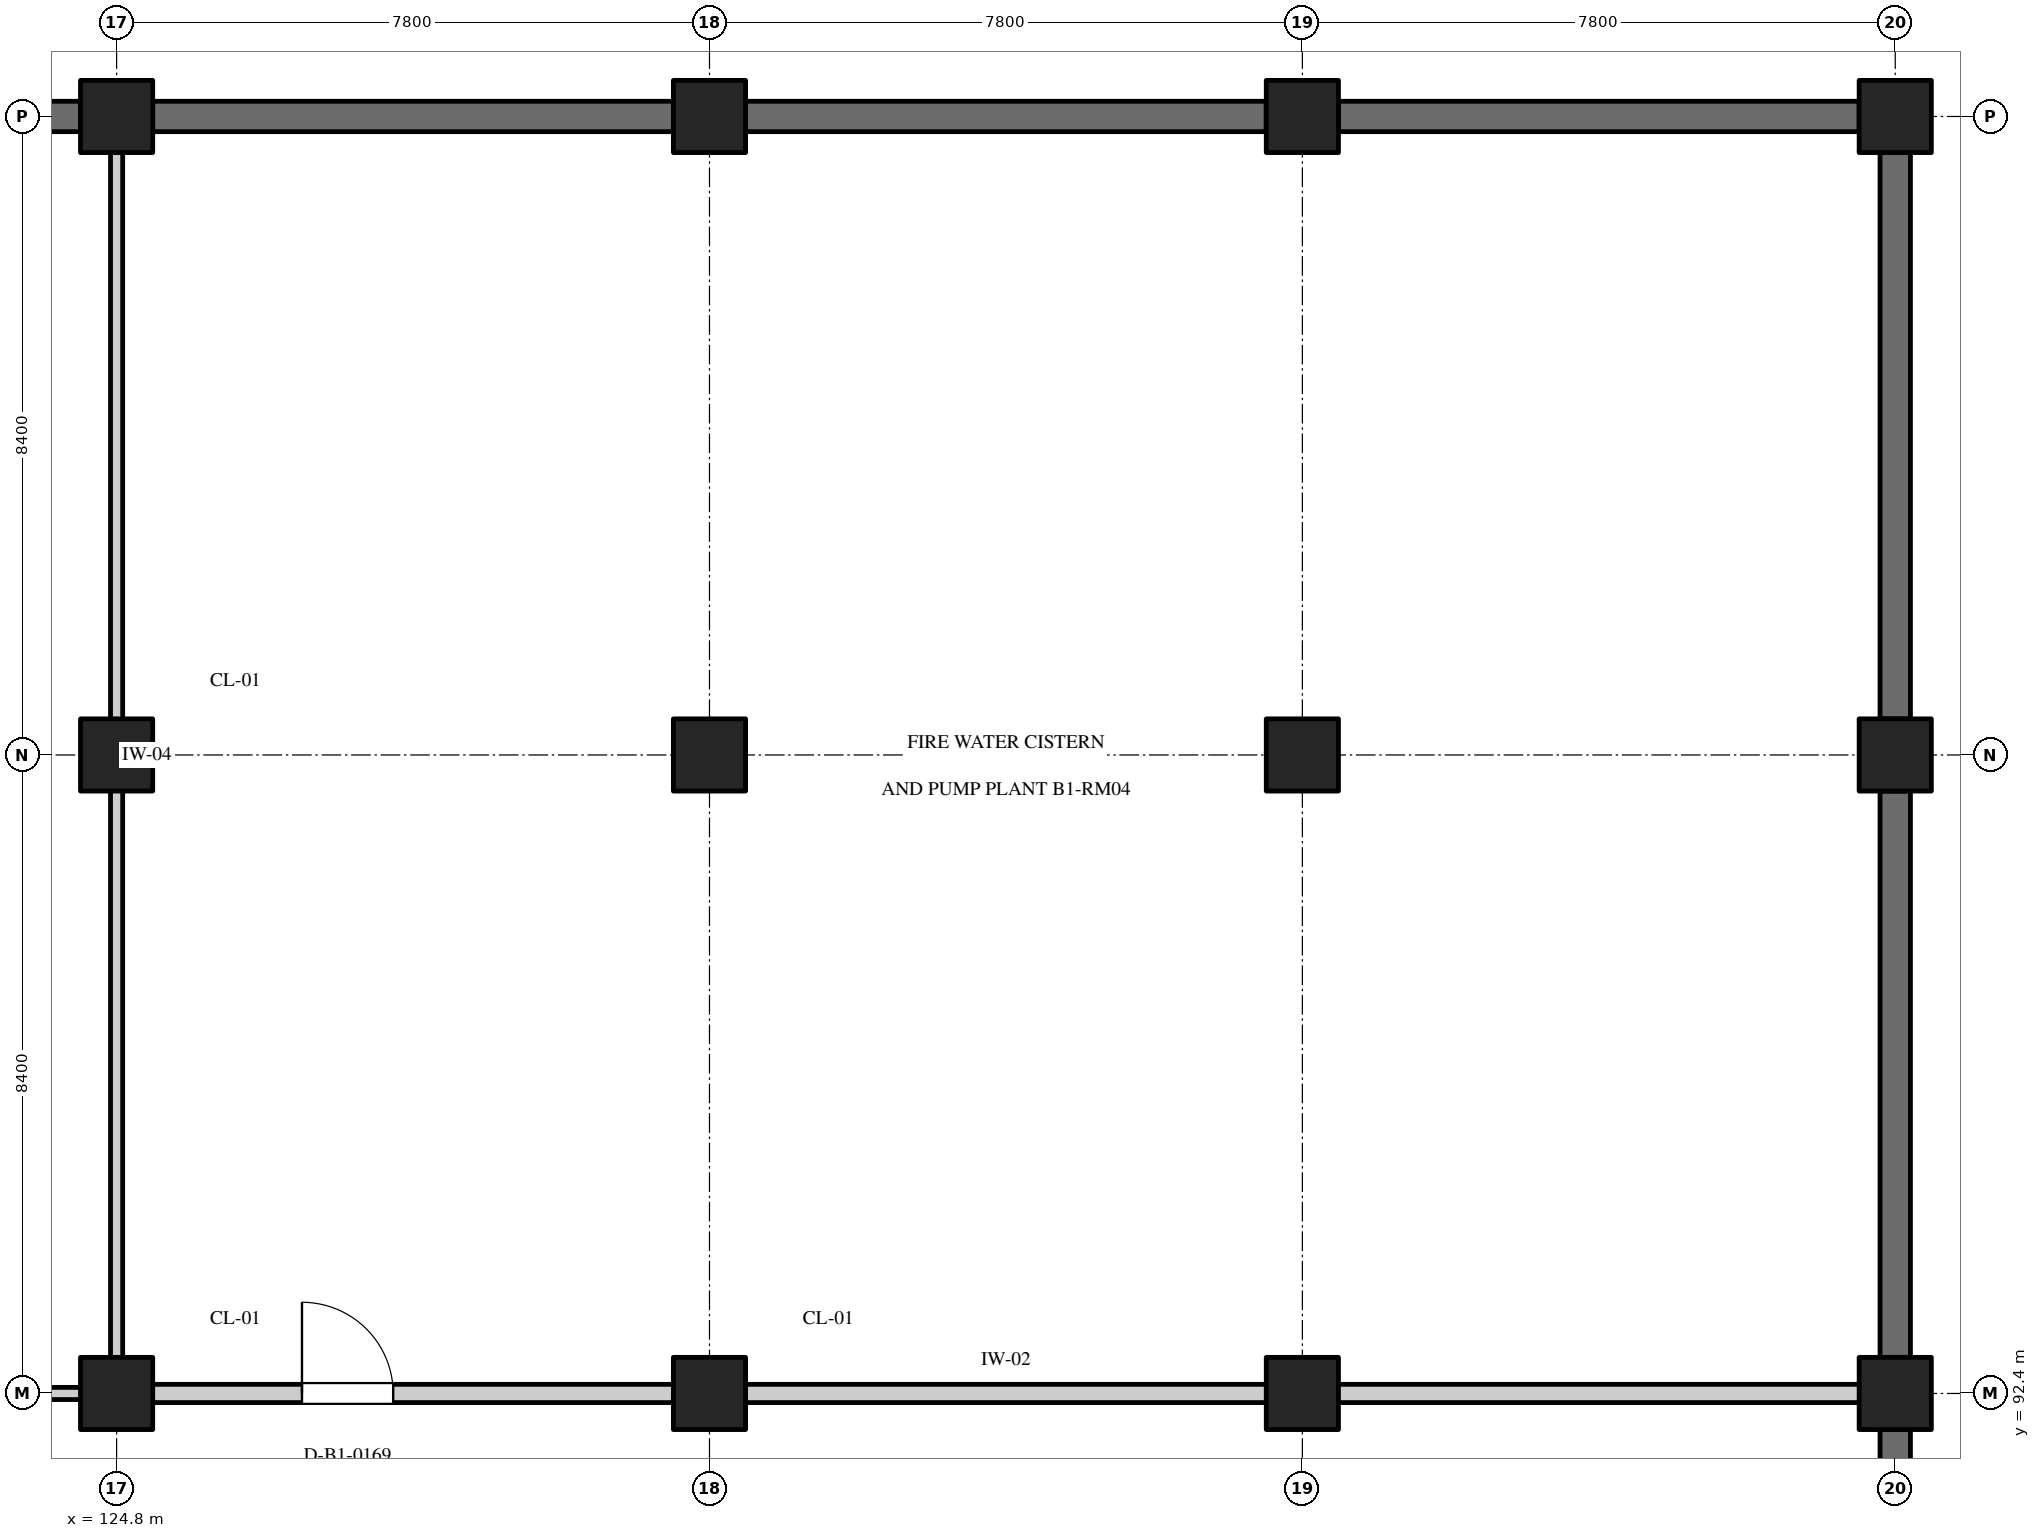
"""IFC4 building model, lengths in metres.
Left out: names, types, materials, properties, quantities, classifications, styles, units other than length and angle.
Written with IfcOpenShell. Run it as: python <this file> out.ifc"""

import sys

from ifc_helpers import new_model, si_unit, direction, frame, frame_2d, origin, origin_2d, place, context, subcontext, project, spatial, rectangle, extrude, element, fill, save


model = new_model("IFC4")
c1 = context("Model", 3, precision=1e-05, world=origin(), true_north=direction((0.0, 1.0)))
c2 = subcontext(c1, "Body", "Model", "MODEL_VIEW")
j1 = project(units=[si_unit("LENGTHUNIT", "METRE"), si_unit("PLANEANGLEUNIT", "RADIAN")], contexts=[c1])
p1 = place(None, origin())
s1 = spatial("IfcSite", under=j1, at=p1, CompositionType="ELEMENT")
p2 = place(p1, origin())
s2 = spatial("IfcBuilding", under=s1, at=p2, CompositionType="ELEMENT")
p3 = place(p2, frame((0.0, 0.0, -4.5)))
s3 = spatial("IfcBuildingStorey", under=s2, at=p3, CompositionType="ELEMENT", Elevation=-4.5)
for number, where, z_axis, x_axis in (
    (1, (124.8, 92.4, 0.0), (0.0, 0.0, 1.0), (1.0, 0.0, 0.0)),
    (2, (124.8, 100.8, 0.0), (0.0, 0.0, 1.0), (1.0, 0.0, 0.0)),
    (3, (124.8, 109.2, 0.0), (0.0, 0.0, 1.0), (1.0, 0.0, 0.0)),
    (4, (132.6, 92.4, 0.0), (0.0, 0.0, 1.0), (1.0, 0.0, 0.0)),
    (5, (132.6, 100.8, 0.0), (0.0, 0.0, 1.0), (1.0, 0.0, 0.0)),
    (6, (132.6, 109.2, 0.0), (0.0, 0.0, 1.0), (1.0, 0.0, 0.0)),
    (7, (140.4, 92.4, 0.0), (0.0, 0.0, 1.0), (1.0, 0.0, 0.0)),
    (8, (140.4, 100.8, 0.0), (0.0, 0.0, 1.0), (1.0, 0.0, 0.0)),
    (9, (140.4, 109.2, 0.0), (0.0, 0.0, 1.0), (1.0, 0.0, 0.0)),
    (10, (148.2, 92.4, 0.0), (0.0, 0.0, 1.0), (1.0, 0.0, 0.0)),
    (11, (148.2, 100.8, 0.0), (0.0, 0.0, 1.0), (1.0, 0.0, 0.0)),
    (12, (148.2, 109.2, 0.0), (0.0, 0.0, 1.0), (1.0, 0.0, 0.0)),
):
    element("IfcColumn", number, at=place(p3, frame(where, z_axis=z_axis, x_axis=x_axis)), inside=s3, PredefinedType="COLUMN", context=c2, shape_type="SweptSolid", body=[
        extrude(rectangle(XDim=0.95, YDim=0.95, at=origin_2d()), origin(), (0.0, 0.0, 1.0), 4.5),
    ])
p4 = place(p3, frame((117.475, 109.2, 0.0), z_axis=(0.0, 0.0, 1.0), x_axis=(1.0, 0.0, 0.0)))
e13 = element("IfcWall", 13, at=p4, inside=s3, PredefinedType="SOLIDWALL", context=c2, shape_type="SweptSolid", body=[
    extrude(rectangle(XDim=6.85, YDim=0.4, at=frame_2d((3.425, 0.0))), origin(), (0.0, 0.0, 1.0), 3.45),
])
for number, where, z_axis, x_axis in (
    (14, (125.275, 109.2, 0.0), (0.0, 0.0, 1.0), (1.0, 0.0, 0.0)),
    (15, (133.075, 109.2, 0.0), (0.0, 0.0, 1.0), (1.0, 0.0, 0.0)),
    (16, (140.875, 109.2, 0.0), (0.0, 0.0, 1.0), (1.0, 0.0, 0.0)),
):
    element("IfcWall", number, at=place(p3, frame(where, z_axis=z_axis, x_axis=x_axis)), inside=s3, PredefinedType="SOLIDWALL", context=c2, shape_type="SweptSolid", body=[
        extrude(rectangle(XDim=6.85, YDim=0.4, at=frame_2d((3.425, 0.0))), origin(), (0.0, 0.0, 1.0), 3.45),
    ])
for number, where, z_axis, x_axis in (
    (17, (148.2, 84.475, 0.0), (0.0, 0.0, 1.0), (0.0, 1.0, 0.0)),
    (18, (148.2, 92.875, 0.0), (0.0, 0.0, 1.0), (0.0, 1.0, 0.0)),
):
    element("IfcWall", number, at=place(p3, frame(where, z_axis=z_axis, x_axis=x_axis)), inside=s3, PredefinedType="SOLIDWALL", context=c2, shape_type="SweptSolid", body=[
        extrude(rectangle(XDim=7.45, YDim=0.4, at=frame_2d((3.725, 0.0))), origin(), (0.0, 0.0, 1.0), 3.45),
    ])
p5 = place(p3, frame((148.2, 101.275, 0.0), z_axis=(0.0, 0.0, 1.0), x_axis=(0.0, 1.0, 0.0)))
e19 = element("IfcWall", 19, at=p5, inside=s3, PredefinedType="SOLIDWALL", context=c2, shape_type="SweptSolid", body=[
    extrude(rectangle(XDim=7.45, YDim=0.4, at=frame_2d((3.725, 0.0))), origin(), (0.0, 0.0, 1.0), 3.45),
])
p6 = place(p3, frame((101.485, 92.4, 0.0), z_axis=(0.0, 0.0, 1.0), x_axis=(1.0, 0.0, 0.0)))
e20 = element("IfcWall", 20, at=p6, inside=s3, PredefinedType="PARTITIONING", context=c2, shape_type="SweptSolid", body=[
    extrude(rectangle(XDim=23.23, YDim=0.16, at=frame_2d((11.615, 0.0))), origin(), (0.0, 0.0, 1.0), 3.4),
])
p7 = place(p6, frame((2.338, 0.0, 0.0)))
e21 = element("IfcOpeningElement", 21, at=p7, cuts=e20, PredefinedType="OPENING", context=c2, shape_type="SweptSolid", body=[
    extrude(rectangle(XDim=1.2, YDim=2.15, at=frame_2d((0.6, 1.075))), frame((0.0, 0.092, 0.0), z_axis=(0.0, -1.0, 0.0), x_axis=(1.0, 0.0, 0.0)), (0.0, 0.0, 1.0), 0.184),
])
p8 = place(p3, frame((124.8, 92.485, 0.0), z_axis=(0.0, 0.0, 1.0), x_axis=(0.0, 1.0, 0.0)))
e22 = element("IfcWall", 22, at=p8, inside=s3, PredefinedType="PARTITIONING", context=c2, shape_type="SweptSolid", body=[
    extrude(rectangle(XDim=16.63, YDim=0.16, at=frame_2d((8.315, 0.0))), origin(), (0.0, 0.0, 1.0), 4.13),
])
p9 = place(p3, frame((124.91, 92.4, 0.0), z_axis=(0.0, 0.0, 1.0), x_axis=(1.0, 0.0, 0.0)))
e23 = element("IfcWall", 23, at=p9, inside=s3, PredefinedType="STANDARD", context=c2, shape_type="SweptSolid", body=[
    extrude(rectangle(XDim=23.18, YDim=0.24, at=frame_2d((11.59, 0.0))), origin(), (0.0, 0.0, 1.0), 3.4),
])
p10 = place(p9, frame((2.329, 0.0, 0.0)))
e24 = element("IfcOpeningElement", 24, at=p10, cuts=e23, PredefinedType="OPENING", context=c2, shape_type="SweptSolid", body=[
    extrude(rectangle(XDim=1.2, YDim=2.15, at=frame_2d((0.6, 1.075))), frame((0.0, 0.132, 0.0), z_axis=(0.0, -1.0, 0.0), x_axis=(1.0, 0.0, 0.0)), (0.0, 0.0, 1.0), 0.264),
])
for number, where, z_axis, x_axis in (
    (25, (132.165, 109.2, 0.0), (0.0, 0.0, 1.0), (1.0, 0.0, 0.0)),
    (26, (139.965, 109.2, 0.0), (0.0, 0.0, 1.0), (1.0, 0.0, 0.0)),
):
    element("IfcWall", number, at=place(p3, frame(where, z_axis=z_axis, x_axis=x_axis)), inside=s3, PredefinedType="STANDARD", context=c2, shape_type="SweptSolid", body=[
        extrude(rectangle(XDim=0.87, YDim=0.24, at=frame_2d((0.435, 0.0))), origin(), (0.0, 0.0, 1.0), 3.4),
    ])
p11 = place(p3, frame((148.2, 100.365, 0.0), z_axis=(0.0, 0.0, 1.0), x_axis=(0.0, 1.0, 0.0)))
e27 = element("IfcWall", 27, at=p11, inside=s3, PredefinedType="STANDARD", context=c2, shape_type="SweptSolid", body=[
    extrude(rectangle(XDim=0.87, YDim=0.24, at=frame_2d((0.435, 0.0))), origin(), (0.0, 0.0, 1.0), 3.4),
])
p12 = place(p10, origin())
e28 = element("IfcDoor", 28, at=p12, inside=s3, OperationType="SINGLE_SWING_LEFT", PredefinedType="DOOR", context=c2, shape_type="SweptSolid", body=[
    extrude(rectangle(XDim=1.2, YDim=2.15, at=frame_2d((0.6, 1.075))), frame((0.0, 0.025, 0.0), z_axis=(0.0, -1.0, 0.0), x_axis=(1.0, 0.0, 0.0)), (0.0, 0.0, 1.0), 0.05),
])
fill(e24, e28)
save(model, sys.argv[1])
